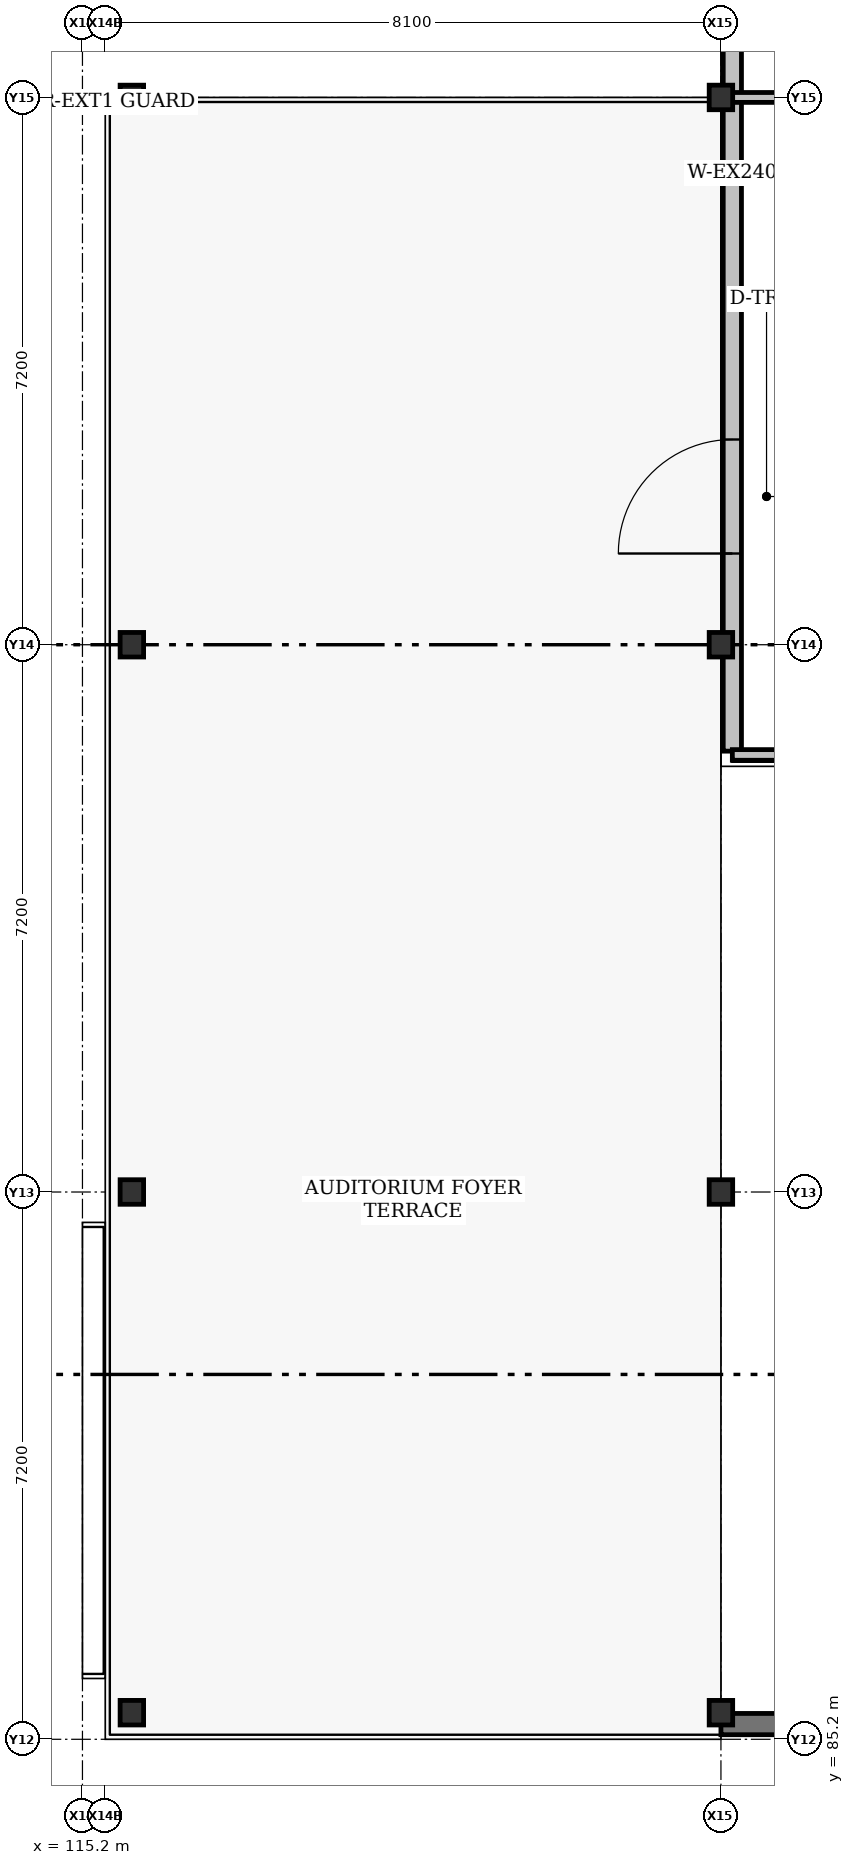
"""IFC4 building model, lengths in metres.
Left out: names, types, materials, properties, quantities, classifications, styles, units other than length and angle.
Written with IfcOpenShell. Run it as: python <this file> out.ifc"""

import sys

from ifc_helpers import new_model, si_unit, direction, frame, frame_2d, origin, origin_2d, place, context, subcontext, project, spatial, rectangle, hollow_circle, i_section, extrude, element, fill, save


model = new_model("IFC4")
c1 = context("Model", 3, precision=1e-05, world=origin(), true_north=direction((0.0, 1.0)))
c2 = subcontext(c1, "Body", "Model", "MODEL_VIEW")
j1 = project(units=[si_unit("LENGTHUNIT", "METRE"), si_unit("PLANEANGLEUNIT", "RADIAN")], contexts=[c1])
p1 = place(None, origin())
s1 = spatial("IfcSite", under=j1, at=p1, CompositionType="ELEMENT")
p2 = place(p1, origin())
s2 = spatial("IfcBuilding", under=s1, at=p2, CompositionType="ELEMENT")
p3 = place(p2, frame((0.0, 0.0, 5.4)))
s3 = spatial("IfcBuildingStorey", under=s2, at=p3, CompositionType="ELEMENT", Elevation=5.4)
p4 = place(p3, frame((114.85, 85.55, 0.0), z_axis=(0.0, 0.0, 1.0), x_axis=(1.0, 0.0, 0.0)))
e1 = element("IfcColumn", 1, at=p4, inside=s3, PredefinedType="COLUMN", context=c2, shape_type="SweptSolid", body=[
    extrude(hollow_circle(Radius=0.203, WallThickness=0.016, at=origin_2d()), origin(), (0.0, 0.0, 1.0), 6.966),
])
p5 = place(p3, frame((114.85, 99.6, 0.0), z_axis=(0.0, 0.0, 1.0), x_axis=(1.0, 0.0, 0.0)))
e2 = element("IfcColumn", 2, at=p5, inside=s3, PredefinedType="COLUMN", context=c2, shape_type="SweptSolid", body=[
    extrude(hollow_circle(Radius=0.203, WallThickness=0.016, at=origin_2d()), origin(), (0.0, 0.0, 1.0), 13.818),
])
p6 = place(p3, frame((114.85, 106.8, 0.0), z_axis=(0.0, 0.0, 1.0), x_axis=(1.0, 0.0, 0.0)))
e3 = element("IfcColumn", 3, at=p6, inside=s3, PredefinedType="COLUMN", context=c2, shape_type="SweptSolid", body=[
    extrude(hollow_circle(Radius=0.203, WallThickness=0.016, at=origin_2d()), origin(), (0.0, 0.0, 1.0), 12.017),
])
p7 = place(p2, frame((0.0, 0.0, 9.9)))
s4 = spatial("IfcBuildingStorey", under=s2, at=p7, CompositionType="ELEMENT", Elevation=9.9)
for number, where, z_axis, x_axis in (
    (4, (115.85, 85.55, 0.0), (0.0, 0.0, 1.0), (1.0, 0.0, 0.0)),
    (5, (115.85, 92.4, 0.0), (0.0, 0.0, 1.0), (1.0, 0.0, 0.0)),
    (6, (115.85, 99.6, 0.0), (0.0, 0.0, 1.0), (1.0, 0.0, 0.0)),
    (7, (115.85, 106.8, 0.0), (0.0, 0.0, 1.0), (1.0, 0.0, 0.0)),
    (8, (123.6, 85.55, 0.0), (0.0, 0.0, 1.0), (1.0, 0.0, 0.0)),
    (9, (123.6, 92.4, 0.0), (0.0, 0.0, 1.0), (1.0, 0.0, 0.0)),
    (10, (123.6, 99.6, 0.0), (0.0, 0.0, 1.0), (1.0, 0.0, 0.0)),
    (11, (123.6, 106.8, 0.0), (0.0, 0.0, 1.0), (1.0, 0.0, 0.0)),
):
    element("IfcColumn", number, at=place(p7, frame(where, z_axis=z_axis, x_axis=x_axis)), inside=s4, PredefinedType="COLUMN", context=c2, shape_type="SweptSolid", body=[
        extrude(i_section(OverallWidth=0.309, OverallDepth=0.323, WebThickness=0.014, FlangeThickness=0.023, FilletRadius=0.015, at=origin_2d()), origin(), (0.0, 0.0, 1.0), 2.9),
    ])
p8 = place(p7, frame((163.85, 85.4, 0.0), z_axis=(0.0, 0.0, 1.0), x_axis=(-1.0, 0.0, 0.0)))
e12 = element("IfcWall", 12, at=p8, inside=s4, PredefinedType="SOLIDWALL", context=c2, shape_type="SweptSolid", body=[
    extrude(rectangle(XDim=40.25, YDim=0.28, at=frame_2d((20.125, 0.0))), origin(), (0.0, 0.0, 1.0), 2.7),
])
p9 = place(p7, frame((123.75, 98.2, 0.0), z_axis=(0.0, 0.0, 1.0), x_axis=(0.0, 1.0, 0.0)))
e13 = element("IfcWall", 13, at=p9, inside=s4, PredefinedType="SOLIDWALL", context=c2, shape_type="SweptSolid", body=[
    extrude(rectangle(XDim=15.2, YDim=0.24, at=frame_2d((7.6, 0.0))), origin(), (0.0, 0.0, 1.0), 2.68),
])
p10 = place(p9, frame((2.6, 0.0, 0.0)))
e14 = element("IfcOpeningElement", 14, at=p10, cuts=e13, PredefinedType="OPENING", context=c2, shape_type="SweptSolid", body=[
    extrude(rectangle(XDim=1.5, YDim=2.25, at=frame_2d((0.75, 1.125))), frame((0.0, 0.12, 0.0), z_axis=(0.0, -1.0, 0.0), x_axis=(1.0, 0.0, 0.0)), (0.0, 0.0, 1.0), 0.24),
])
p11 = place(p7, frame((123.75, 98.15, 0.0), z_axis=(0.0, 0.0, 1.0), x_axis=(1.0, 0.0, 0.0)))
e15 = element("IfcWall", 15, at=p11, inside=s4, PredefinedType="PARTITIONING", context=c2, shape_type="SweptSolid", body=[
    extrude(rectangle(XDim=24.25, YDim=0.14, at=frame_2d((12.125, 0.0))), origin(), (0.0, 0.0, 1.0), 3.95),
])
p12 = place(p7, frame((123.75, 106.8, 0.0), z_axis=(0.0, 0.0, 1.0), x_axis=(1.0, 0.0, 0.0)))
e16 = element("IfcWall", 16, at=p12, inside=s4, PredefinedType="PARTITIONING", context=c2, shape_type="SweptSolid", body=[
    extrude(rectangle(XDim=24.101, YDim=0.13, at=frame_2d((12.05, 0.0))), origin(), (0.0, 0.0, 1.0), 3.95),
])
p13 = place(p10, origin())
e17 = element("IfcDoor", 17, at=p13, inside=s4, OperationType="SINGLE_SWING_LEFT", PredefinedType="DOOR", context=c2, shape_type="SweptSolid", body=[
    extrude(rectangle(XDim=1.5, YDim=2.25, at=frame_2d((0.75, 1.125))), frame((0.0, 0.025, 0.0), z_axis=(0.0, -1.0, 0.0), x_axis=(1.0, 0.0, 0.0)), (0.0, 0.0, 1.0), 0.05),
])
fill(e14, e17)
save(model, sys.argv[1])
